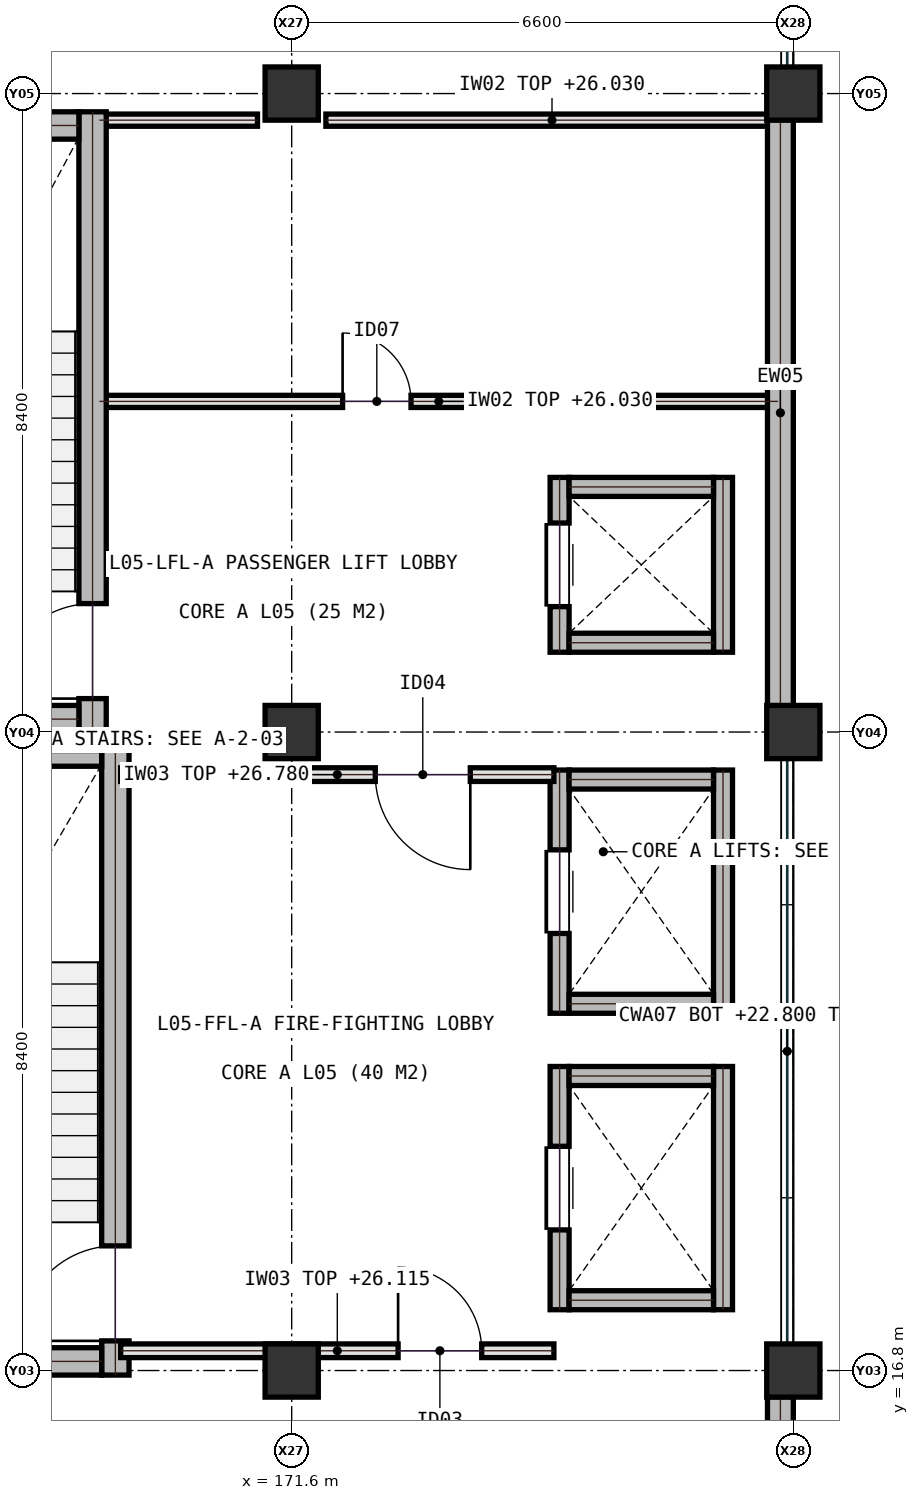
"""IFC4 building model, lengths in metres.
Left out: names, types, materials, properties, quantities, classifications, styles, units other than length and angle.
Written with IfcOpenShell. Run it as: python <this file> out.ifc"""

import sys

from ifc_helpers import new_model, si_unit, direction, frame, frame_2d, origin, origin_2d, place, context, subcontext, project, spatial, rectangle, extrude, element, fill, save


model = new_model("IFC4")
c1 = context("Model", 3, precision=1e-05, world=origin(), true_north=direction((0.0, 1.0)))
c2 = subcontext(c1, "Body", "Model", "MODEL_VIEW")
j1 = project(units=[si_unit("LENGTHUNIT", "METRE"), si_unit("PLANEANGLEUNIT", "RADIAN")], contexts=[c1])
p1 = place(None, origin())
s1 = spatial("IfcSite", under=j1, at=p1, CompositionType="ELEMENT")
p2 = place(p1, origin())
s2 = spatial("IfcBuilding", under=s1, at=p2, CompositionType="ELEMENT")
p3 = place(p2, frame((0.0, 0.0, 22.8)))
s3 = spatial("IfcBuildingStorey", under=s2, at=p3, CompositionType="ELEMENT", Elevation=22.8)
for number, where, z_axis, x_axis in (
    (1, (171.6, 16.8, 0.0), (0.0, 0.0, 1.0), (1.0, 0.0, 0.0)),
    (2, (171.6, 25.2, 0.0), (0.0, 0.0, 1.0), (1.0, 0.0, 0.0)),
    (3, (171.6, 33.6, 0.0), (0.0, 0.0, 1.0), (1.0, 0.0, 0.0)),
    (4, (178.2, 16.8, 0.0), (0.0, 0.0, 1.0), (1.0, 0.0, 0.0)),
    (5, (178.2, 25.2, 0.0), (0.0, 0.0, 1.0), (1.0, 0.0, 0.0)),
    (6, (178.2, 33.6, 0.0), (0.0, 0.0, 1.0), (1.0, 0.0, 0.0)),
):
    element("IfcColumn", number, at=place(p3, frame(where, z_axis=z_axis, x_axis=x_axis)), inside=s3, PredefinedType="COLUMN", context=c2, shape_type="SweptSolid", body=[
        extrude(rectangle(XDim=0.7, YDim=0.7, at=origin_2d()), origin(), (0.0, 0.0, 1.0), 4.2),
    ])
p4 = place(p3, frame((169.07, 29.55, 0.0), z_axis=(0.0, 0.0, 1.0), x_axis=(1.0, 0.0, 0.0)))
e7 = element("IfcWall", 7, at=p4, inside=s3, PredefinedType="PARTITIONING", context=c2, shape_type="SweptSolid", body=[
    extrude(rectangle(XDim=8.93, YDim=0.16, at=frame_2d((4.465, 0.0))), origin(), (0.0, 0.0, 1.0), 3.23),
])
p5 = place(p4, frame((3.2, 0.0, 0.0)))
e8 = element("IfcOpeningElement", 8, at=p5, cuts=e7, PredefinedType="OPENING", context=c2, shape_type="SweptSolid", body=[
    extrude(rectangle(XDim=0.9, YDim=2.1, at=frame_2d((0.45, 1.05))), frame((0.0, 0.09, 0.0), z_axis=(0.0, -1.0, 0.0), x_axis=(1.0, 0.0, 0.0)), (0.0, 0.0, 1.0), 0.18),
])
p6 = place(p3, frame((169.07, 33.25, 0.0), z_axis=(0.0, 0.0, 1.0), x_axis=(1.0, 0.0, 0.0)))
e9 = element("IfcWall", 9, at=p6, inside=s3, PredefinedType="PARTITIONING", context=c2, shape_type="SweptSolid", body=[
    extrude(rectangle(XDim=2.08, YDim=0.16, at=frame_2d((1.04, 0.0))), origin(), (0.0, 0.0, 1.0), 3.23),
])
p7 = place(p3, frame((172.05, 33.25, 0.0), z_axis=(0.0, 0.0, 1.0), x_axis=(1.0, 0.0, 0.0)))
e10 = element("IfcWall", 10, at=p7, inside=s3, PredefinedType="PARTITIONING", context=c2, shape_type="SweptSolid", body=[
    extrude(rectangle(XDim=5.95, YDim=0.16, at=frame_2d((2.975, 0.0))), origin(), (0.0, 0.0, 1.0), 3.23),
])
for number, where, z_axis, x_axis in (
    (11, (178.03, 8.745, 0.0), (0.0, 0.0, 1.0), (0.0, 1.0, 0.0)),
    (12, (178.03, 25.545, 0.0), (0.0, 0.0, 1.0), (0.0, 1.0, 0.0)),
):
    element("IfcWall", number, at=place(p3, frame(where, z_axis=z_axis, x_axis=x_axis)), inside=s3, PredefinedType="SHEAR", context=c2, shape_type="SweptSolid", body=[
        extrude(rectangle(XDim=7.71, YDim=0.34, at=frame_2d((3.855, 0.0))), origin(), (0.0, 0.0, 1.0), 3.98),
    ])
p8 = place(p3, frame((169.28, 16.74, 0.0), z_axis=(0.0, 0.0, 1.0), x_axis=(0.0, 1.0, 0.0)))
e13 = element("IfcWall", 13, at=p8, inside=s3, PredefinedType="SHEAR", context=c2, shape_type="SweptSolid", body=[
    extrude(rectangle(XDim=8.37, YDim=0.36, at=frame_2d((4.185, 0.0))), origin(), (0.0, 0.0, 1.0), 3.98),
])
p9 = place(p8, frame((0.45, 0.0, 0.0)))
e14 = element("IfcOpeningElement", 14, at=p9, cuts=e13, PredefinedType="OPENING", context=c2, shape_type="SweptSolid", body=[
    extrude(rectangle(XDim=1.25, YDim=2.15, at=frame_2d((0.625, 1.075))), frame((0.0, 0.19, 0.0), z_axis=(0.0, -1.0, 0.0), x_axis=(1.0, 0.0, 0.0)), (0.0, 0.0, 1.0), 0.38),
])
for number, where, z_axis, x_axis in (
    (15, (165.6, 24.93, 0.0), (0.0, 0.0, 1.0), (1.0, 0.0, 0.0)),
    (16, (165.6, 16.92, 0.0), (0.0, 0.0, 1.0), (1.0, 0.0, 0.0)),
):
    element("IfcWall", number, at=place(p3, frame(where, z_axis=z_axis, x_axis=x_axis)), inside=s3, PredefinedType="SHEAR", context=c2, shape_type="SweptSolid", body=[
        extrude(rectangle(XDim=3.5, YDim=0.36, at=frame_2d((1.75, 0.0))), origin(), (0.0, 0.0, 1.0), 3.98),
    ])
p10 = place(p3, frame((168.98, 25.19, 0.0), z_axis=(0.0, 0.0, 1.0), x_axis=(0.0, 1.0, 0.0)))
e17 = element("IfcWall", 17, at=p10, inside=s3, PredefinedType="SHEAR", context=c2, shape_type="SweptSolid", body=[
    extrude(rectangle(XDim=8.17, YDim=0.36, at=frame_2d((4.085, 0.0))), origin(), (0.0, 0.0, 1.0), 3.98),
])
p11 = place(p10, frame((0.45, 0.0, 0.0)))
e18 = element("IfcOpeningElement", 18, at=p11, cuts=e17, PredefinedType="OPENING", context=c2, shape_type="SweptSolid", body=[
    extrude(rectangle(XDim=1.25, YDim=2.15, at=frame_2d((0.625, 1.075))), frame((0.0, 0.19, 0.0), z_axis=(0.0, -1.0, 0.0), x_axis=(1.0, 0.0, 0.0)), (0.0, 0.0, 1.0), 0.38),
])
for number, where, z_axis, x_axis in (
    (19, (165.6, 33.18, 0.0), (0.0, 0.0, 1.0), (1.0, 0.0, 0.0)),
    (20, (165.6, 25.37, 0.0), (0.0, 0.0, 1.0), (1.0, 0.0, 0.0)),
):
    element("IfcWall", number, at=place(p3, frame(where, z_axis=z_axis, x_axis=x_axis)), inside=s3, PredefinedType="SHEAR", context=c2, shape_type="SweptSolid", body=[
        extrude(rectangle(XDim=3.2, YDim=0.36, at=frame_2d((1.6, 0.0))), origin(), (0.0, 0.0, 1.0), 3.98),
    ])
p12 = place(p3, frame((175.125, 17.6, 0.0), z_axis=(0.0, 0.0, 1.0), x_axis=(0.0, 1.0, 0.0)))
e21 = element("IfcWall", 21, at=p12, inside=s3, PredefinedType="SHEAR", context=c2, shape_type="SweptSolid", body=[
    extrude(rectangle(XDim=3.2, YDim=0.25, at=frame_2d((1.6, 0.0))), origin(), (0.0, 0.0, 1.0), 3.98),
])
p13 = place(p12, frame((1.05, 0.0, 0.0)))
e22 = element("IfcOpeningElement", 22, at=p13, cuts=e21, PredefinedType="OPENING", context=c2, shape_type="SweptSolid", body=[
    extrude(rectangle(XDim=1.1, YDim=2.15, at=frame_2d((0.55, 1.075))), frame((0.0, 0.135, 0.0), z_axis=(0.0, -1.0, 0.0), x_axis=(1.0, 0.0, 0.0)), (0.0, 0.0, 1.0), 0.27),
])
p14 = place(p3, frame((177.275, 17.6, 0.0), z_axis=(0.0, 0.0, 1.0), x_axis=(0.0, 1.0, 0.0)))
e23 = element("IfcWall", 23, at=p14, inside=s3, PredefinedType="SHEAR", context=c2, shape_type="SweptSolid", body=[
    extrude(rectangle(XDim=3.2, YDim=0.25, at=frame_2d((1.6, 0.0))), origin(), (0.0, 0.0, 1.0), 3.98),
])
for number, where, z_axis, x_axis in (
    (24, (175.25, 17.725, 0.0), (0.0, 0.0, 1.0), (1.0, 0.0, 0.0)),
    (25, (175.25, 20.675, 0.0), (0.0, 0.0, 1.0), (1.0, 0.0, 0.0)),
):
    element("IfcWall", number, at=place(p3, frame(where, z_axis=z_axis, x_axis=x_axis)), inside=s3, PredefinedType="SHEAR", context=c2, shape_type="SweptSolid", body=[
        extrude(rectangle(XDim=1.9, YDim=0.25, at=frame_2d((0.95, 0.0))), origin(), (0.0, 0.0, 1.0), 3.98),
    ])
p15 = place(p3, frame((175.125, 21.5, 0.0), z_axis=(0.0, 0.0, 1.0), x_axis=(0.0, 1.0, 0.0)))
e26 = element("IfcWall", 26, at=p15, inside=s3, PredefinedType="SHEAR", context=c2, shape_type="SweptSolid", body=[
    extrude(rectangle(XDim=3.2, YDim=0.25, at=frame_2d((1.6, 0.0))), origin(), (0.0, 0.0, 1.0), 3.98),
])
p16 = place(p15, frame((1.05, 0.0, 0.0)))
e27 = element("IfcOpeningElement", 27, at=p16, cuts=e26, PredefinedType="OPENING", context=c2, shape_type="SweptSolid", body=[
    extrude(rectangle(XDim=1.1, YDim=2.15, at=frame_2d((0.55, 1.075))), frame((0.0, 0.135, 0.0), z_axis=(0.0, -1.0, 0.0), x_axis=(1.0, 0.0, 0.0)), (0.0, 0.0, 1.0), 0.27),
])
p17 = place(p3, frame((177.275, 21.5, 0.0), z_axis=(0.0, 0.0, 1.0), x_axis=(0.0, 1.0, 0.0)))
e28 = element("IfcWall", 28, at=p17, inside=s3, PredefinedType="SHEAR", context=c2, shape_type="SweptSolid", body=[
    extrude(rectangle(XDim=3.2, YDim=0.25, at=frame_2d((1.6, 0.0))), origin(), (0.0, 0.0, 1.0), 3.98),
])
for number, where, z_axis, x_axis in (
    (29, (175.25, 21.625, 0.0), (0.0, 0.0, 1.0), (1.0, 0.0, 0.0)),
    (30, (175.25, 24.575, 0.0), (0.0, 0.0, 1.0), (1.0, 0.0, 0.0)),
):
    element("IfcWall", number, at=place(p3, frame(where, z_axis=z_axis, x_axis=x_axis)), inside=s3, PredefinedType="SHEAR", context=c2, shape_type="SweptSolid", body=[
        extrude(rectangle(XDim=1.9, YDim=0.25, at=frame_2d((0.95, 0.0))), origin(), (0.0, 0.0, 1.0), 3.98),
    ])
p18 = place(p3, frame((175.125, 26.25, 0.0), z_axis=(0.0, 0.0, 1.0), x_axis=(0.0, 1.0, 0.0)))
e31 = element("IfcWall", 31, at=p18, inside=s3, PredefinedType="SHEAR", context=c2, shape_type="SweptSolid", body=[
    extrude(rectangle(XDim=2.3, YDim=0.25, at=frame_2d((1.15, 0.0))), origin(), (0.0, 0.0, 1.0), 3.98),
])
p19 = place(p18, frame((0.6, 0.0, 0.0)))
e32 = element("IfcOpeningElement", 32, at=p19, cuts=e31, PredefinedType="OPENING", context=c2, shape_type="SweptSolid", body=[
    extrude(rectangle(XDim=1.1, YDim=2.15, at=frame_2d((0.55, 1.075))), frame((0.0, 0.135, 0.0), z_axis=(0.0, -1.0, 0.0), x_axis=(1.0, 0.0, 0.0)), (0.0, 0.0, 1.0), 0.27),
])
p20 = place(p3, frame((177.275, 26.25, 0.0), z_axis=(0.0, 0.0, 1.0), x_axis=(0.0, 1.0, 0.0)))
e33 = element("IfcWall", 33, at=p20, inside=s3, PredefinedType="SHEAR", context=c2, shape_type="SweptSolid", body=[
    extrude(rectangle(XDim=2.3, YDim=0.25, at=frame_2d((1.15, 0.0))), origin(), (0.0, 0.0, 1.0), 3.98),
])
for number, where, z_axis, x_axis in (
    (34, (175.25, 26.375, 0.0), (0.0, 0.0, 1.0), (1.0, 0.0, 0.0)),
    (35, (175.25, 28.425, 0.0), (0.0, 0.0, 1.0), (1.0, 0.0, 0.0)),
):
    element("IfcWall", number, at=place(p3, frame(where, z_axis=z_axis, x_axis=x_axis)), inside=s3, PredefinedType="SHEAR", context=c2, shape_type="SweptSolid", body=[
        extrude(rectangle(XDim=1.9, YDim=0.25, at=frame_2d((0.95, 0.0))), origin(), (0.0, 0.0, 1.0), 3.98),
    ])
p21 = place(p3, frame((169.35, 24.64, 0.0), z_axis=(0.0, 0.0, 1.0), x_axis=(1.0, 0.0, 0.0)))
e36 = element("IfcWall", 36, at=p21, inside=s3, PredefinedType="SOLIDWALL", context=c2, shape_type="SweptSolid", body=[
    extrude(rectangle(XDim=5.7, YDim=0.18, at=frame_2d((2.85, 0.0))), origin(), (0.0, 0.0, 1.0), 3.98),
])
p22 = place(p21, frame((3.35, 0.0, 0.0)))
e37 = element("IfcOpeningElement", 37, at=p22, cuts=e36, PredefinedType="OPENING", context=c2, shape_type="SweptSolid", body=[
    extrude(rectangle(XDim=1.25, YDim=2.15, at=frame_2d((0.625, 1.075))), frame((0.0, 0.1, 0.0), z_axis=(0.0, -1.0, 0.0), x_axis=(1.0, 0.0, 0.0)), (0.0, 0.0, 1.0), 0.2),
])
p23 = place(p3, frame((169.35, 17.06, 0.0), z_axis=(0.0, 0.0, 1.0), x_axis=(1.0, 0.0, 0.0)))
e38 = element("IfcWall", 38, at=p23, inside=s3, PredefinedType="SOLIDWALL", context=c2, shape_type="SweptSolid", body=[
    extrude(rectangle(XDim=5.7, YDim=0.18, at=frame_2d((2.85, 0.0))), origin(), (0.0, 0.0, 1.0), 3.315),
])
p24 = place(p23, frame((3.65, 0.0, 0.0)))
e39 = element("IfcOpeningElement", 39, at=p24, cuts=e38, PredefinedType="OPENING", context=c2, shape_type="SweptSolid", body=[
    extrude(rectangle(XDim=1.1, YDim=2.15, at=frame_2d((0.55, 1.075))), frame((0.0, 0.1, 0.0), z_axis=(0.0, -1.0, 0.0), x_axis=(1.0, 0.0, 0.0)), (0.0, 0.0, 1.0), 0.2),
])
p25 = place(p5, origin())
e40 = element("IfcDoor", 40, at=p25, inside=s3, OperationType="SINGLE_SWING_LEFT", PredefinedType="DOOR", context=c2, shape_type="SweptSolid", body=[
    extrude(rectangle(XDim=0.9, YDim=2.1, at=frame_2d((0.45, 1.05))), frame((0.0, 0.025, 0.0), z_axis=(0.0, -1.0, 0.0), x_axis=(1.0, 0.0, 0.0)), (0.0, 0.0, 1.0), 0.05),
])
fill(e8, e40)
p26 = place(p9, origin())
e41 = element("IfcDoor", 41, at=p26, inside=s3, OperationType="SINGLE_SWING_LEFT", PredefinedType="DOOR", context=c2, shape_type="SweptSolid", body=[
    extrude(rectangle(XDim=1.25, YDim=2.15, at=frame_2d((0.625, 1.075))), frame((0.0, 0.025, 0.0), z_axis=(0.0, -1.0, 0.0), x_axis=(1.0, 0.0, 0.0)), (0.0, 0.0, 1.0), 0.05),
])
fill(e14, e41)
p27 = place(p11, origin())
e42 = element("IfcDoor", 42, at=p27, inside=s3, OperationType="SINGLE_SWING_LEFT", PredefinedType="DOOR", context=c2, shape_type="SweptSolid", body=[
    extrude(rectangle(XDim=1.25, YDim=2.15, at=frame_2d((0.625, 1.075))), frame((0.0, 0.025, 0.0), z_axis=(0.0, -1.0, 0.0), x_axis=(1.0, 0.0, 0.0)), (0.0, 0.0, 1.0), 0.05),
])
fill(e18, e42)
p28 = place(p13, origin())
e43 = element("IfcDoor", 43, at=p28, inside=s3, OperationType="SLIDING_TO_LEFT", PredefinedType="DOOR", context=c2, shape_type="SweptSolid", body=[
    extrude(rectangle(XDim=1.1, YDim=2.15, at=frame_2d((0.55, 1.075))), frame((0.0, 0.025, 0.0), z_axis=(0.0, -1.0, 0.0), x_axis=(1.0, 0.0, 0.0)), (0.0, 0.0, 1.0), 0.05),
])
fill(e22, e43)
p29 = place(p16, origin())
e44 = element("IfcDoor", 44, at=p29, inside=s3, OperationType="SLIDING_TO_LEFT", PredefinedType="DOOR", context=c2, shape_type="SweptSolid", body=[
    extrude(rectangle(XDim=1.1, YDim=2.15, at=frame_2d((0.55, 1.075))), frame((0.0, 0.025, 0.0), z_axis=(0.0, -1.0, 0.0), x_axis=(1.0, 0.0, 0.0)), (0.0, 0.0, 1.0), 0.05),
])
fill(e27, e44)
p30 = place(p19, origin())
e45 = element("IfcDoor", 45, at=p30, inside=s3, OperationType="SLIDING_TO_LEFT", PredefinedType="DOOR", context=c2, shape_type="SweptSolid", body=[
    extrude(rectangle(XDim=1.1, YDim=2.15, at=frame_2d((0.55, 1.075))), frame((0.0, 0.025, 0.0), z_axis=(0.0, -1.0, 0.0), x_axis=(1.0, 0.0, 0.0)), (0.0, 0.0, 1.0), 0.05),
])
fill(e32, e45)
p31 = place(p22, frame((1.25, 0.0, 0.0), z_axis=(0.0, 0.0, 1.0), x_axis=(-1.0, 0.0, 0.0)))
e46 = element("IfcDoor", 46, at=p31, inside=s3, OperationType="SINGLE_SWING_RIGHT", PredefinedType="DOOR", context=c2, shape_type="SweptSolid", body=[
    extrude(rectangle(XDim=1.25, YDim=2.15, at=frame_2d((0.625, 1.075))), frame((0.0, 0.025, 0.0), z_axis=(0.0, -1.0, 0.0), x_axis=(1.0, 0.0, 0.0)), (0.0, 0.0, 1.0), 0.05),
])
fill(e37, e46)
p32 = place(p24, origin())
e47 = element("IfcDoor", 47, at=p32, inside=s3, OperationType="SINGLE_SWING_LEFT", PredefinedType="DOOR", context=c2, shape_type="SweptSolid", body=[
    extrude(rectangle(XDim=1.1, YDim=2.15, at=frame_2d((0.55, 1.075))), frame((0.0, 0.025, 0.0), z_axis=(0.0, -1.0, 0.0), x_axis=(1.0, 0.0, 0.0)), (0.0, 0.0, 1.0), 0.05),
])
fill(e39, e47)
save(model, sys.argv[1])
